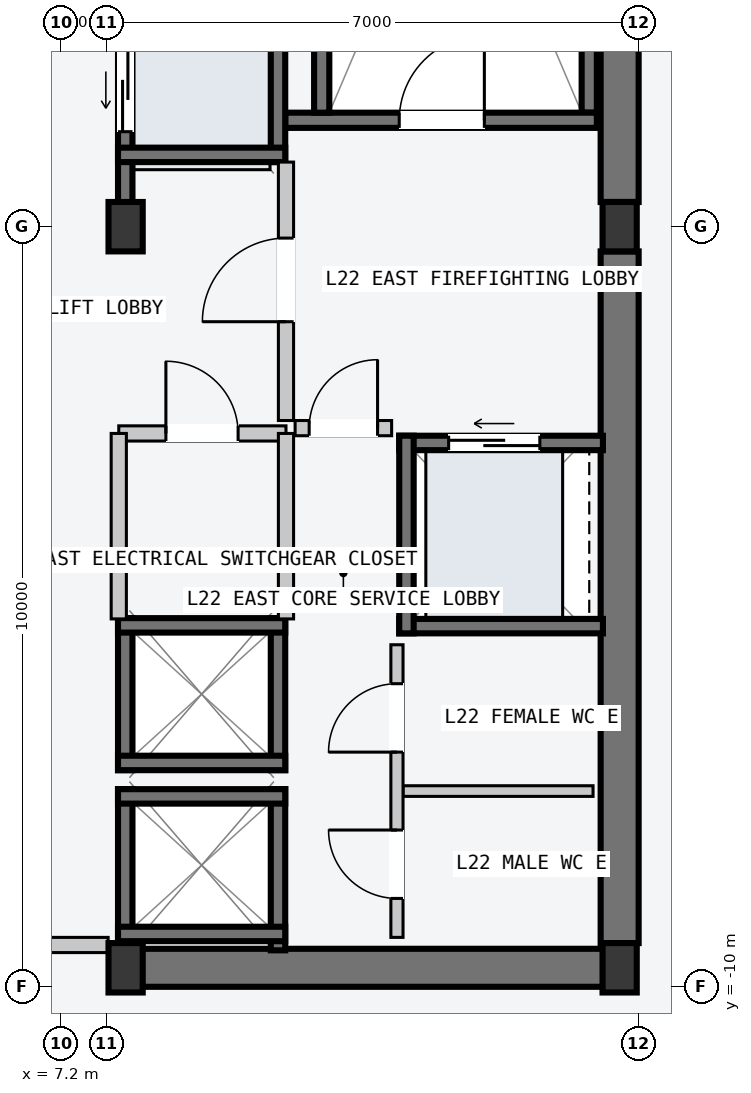
"""IFC4 building model, lengths in metres.
Left out: names, types, materials, properties, quantities, classifications, styles, units other than length and angle.
Written with IfcOpenShell. Run it as: python <this file> out.ifc"""

import sys

from ifc_helpers import new_model, si_unit, direction, frame, frame_2d, origin, origin_2d, place, context, subcontext, project, spatial, rectangle, i_section, extrude, element, fill, save


model = new_model("IFC4")
c1 = context("Model", 3, precision=1e-05, world=origin(), true_north=direction((0.0, 1.0)))
c2 = subcontext(c1, "Body", "Model", "MODEL_VIEW")
j1 = project(units=[si_unit("LENGTHUNIT", "METRE"), si_unit("PLANEANGLEUNIT", "RADIAN")], contexts=[c1])
p1 = place(None, origin())
s1 = spatial("IfcSite", under=j1, at=p1, CompositionType="ELEMENT")
p2 = place(p1, origin())
s2 = spatial("IfcBuilding", under=s1, at=p2, CompositionType="ELEMENT")
p3 = place(p2, frame((0.0, 0.0, 87.3)))
s3 = spatial("IfcBuildingStorey", under=s2, at=p3, CompositionType="ELEMENT", Elevation=87.3)
p4 = place(p3, frame((8.07, -9.75, -0.2), z_axis=(0.0, 0.0, 1.0), x_axis=(1.0, 0.0, 0.0)))
e1 = element("IfcWall", 1, at=p4, inside=s3, PredefinedType="SHEAR", context=c2, shape_type="SweptSolid", body=[
    extrude(rectangle(XDim=6.46, YDim=0.5, at=frame_2d((3.23, 0.0))), origin(), (0.0, 0.0, 1.0), 4.5),
])
for number, where, z_axis, x_axis in (
    (2, (14.55, -9.425, -0.2), (0.0, 0.0, 1.0), (0.0, 1.0, 0.0)),
    (3, (14.55, 0.325, -0.2), (0.0, 0.0, 1.0), (0.0, 1.0, 0.0)),
):
    element("IfcWall", number, at=place(p3, frame(where, z_axis=z_axis, x_axis=x_axis)), inside=s3, PredefinedType="SHEAR", context=c2, shape_type="SweptSolid", body=[
        extrude(rectangle(XDim=9.1, YDim=0.5, at=frame_2d((4.55, 0.0))), origin(), (0.0, 0.0, 1.0), 4.5),
    ])
p5 = place(p3, frame((14.15, 1.5, -0.2), z_axis=(0.0, 0.0, 1.0), x_axis=(0.0, 1.0, 0.0)))
e4 = element("IfcWall", 4, at=p5, inside=s3, PredefinedType="SOLIDWALL", context=c2, shape_type="SweptSolid", body=[
    extrude(rectangle(XDim=7.8, YDim=0.2, at=frame_2d((3.9, 0.0))), origin(), (0.0, 0.0, 1.0), 4.5),
])
p6 = place(p3, frame((10.15, 1.4, -0.2), z_axis=(0.0, 0.0, 1.0), x_axis=(1.0, 0.0, 0.0)))
e5 = element("IfcWall", 5, at=p6, inside=s3, PredefinedType="SOLIDWALL", context=c2, shape_type="SweptSolid", body=[
    extrude(rectangle(XDim=4.1, YDim=0.2, at=frame_2d((2.05, 0.0))), origin(), (0.0, 0.0, 1.0), 4.5),
])
p7 = place(p6, frame((1.5, 0.0, 0.2)))
e6 = element("IfcOpeningElement", 6, at=p7, cuts=e5, PredefinedType="OPENING", context=c2, shape_type="SweptSolid", body=[
    extrude(rectangle(XDim=1.12, YDim=2.18, at=frame_2d((0.56, 1.09))), frame((0.0, 0.11, 0.0), z_axis=(0.0, -1.0, 0.0), x_axis=(1.0, 0.0, 0.0)), (0.0, 0.0, 1.0), 0.22),
])
p8 = place(p3, frame((10.63, 1.5, -0.2), z_axis=(0.0, 0.0, 1.0), x_axis=(0.0, 1.0, 0.0)))
e7 = element("IfcWall", 7, at=p8, inside=s3, PredefinedType="SOLIDWALL", context=c2, shape_type="SweptSolid", body=[
    extrude(rectangle(XDim=7.8, YDim=0.2, at=frame_2d((3.9, 0.0))), origin(), (0.0, 0.0, 1.0), 4.5),
])
for number, where, z_axis, x_axis in (
    (8, (8.05, -9.75, 0.0), (0.0, 0.0, 1.0), (1.0, 0.0, 0.0)),
    (9, (8.05, 0.0, 0.0), (0.0, 0.0, 1.0), (1.0, 0.0, 0.0)),
    (10, (14.55, -9.75, 0.0), (0.0, 0.0, 1.0), (1.0, 0.0, 0.0)),
    (11, (14.55, 0.0, 0.0), (0.0, 0.0, 1.0), (1.0, 0.0, 0.0)),
):
    element("IfcColumn", number, at=place(p3, frame(where, z_axis=z_axis, x_axis=x_axis)), inside=s3, PredefinedType="COLUMN", context=c2, shape_type="SweptSolid", body=[
        extrude(i_section(OverallWidth=0.45, OverallDepth=0.65, WebThickness=0.025, FlangeThickness=0.04, at=origin_2d()), origin(), (0.0, 0.0, 1.0), 4.5),
    ])
p9 = place(p3, frame((8.045, 0.21, -0.2), z_axis=(0.0, 0.0, 1.0), x_axis=(0.0, 1.0, 0.0)))
e12 = element("IfcWall", 12, at=p9, inside=s3, PredefinedType="SOLIDWALL", context=c2, shape_type="SweptSolid", body=[
    extrude(rectangle(XDim=2.54, YDim=0.19, at=frame_2d((1.27, 0.0))), origin(), (0.0, 0.0, 1.0), 4.5),
])
p10 = place(p9, frame((1.04, 0.0, 0.2)))
e13 = element("IfcOpeningElement", 13, at=p10, cuts=e12, PredefinedType="OPENING", context=c2, shape_type="SweptSolid", body=[
    extrude(rectangle(XDim=1.1, YDim=2.2, at=frame_2d((0.55, 1.1))), frame((0.0, 0.105, 0.0), z_axis=(0.0, -1.0, 0.0), x_axis=(1.0, 0.0, 0.0)), (0.0, 0.0, 1.0), 0.21),
])
p11 = place(p3, frame((10.055, 0.85, -0.2), z_axis=(0.0, 0.0, 1.0), x_axis=(0.0, 1.0, 0.0)))
e14 = element("IfcWall", 14, at=p11, inside=s3, PredefinedType="SOLIDWALL", context=c2, shape_type="SweptSolid", body=[
    extrude(rectangle(XDim=1.9, YDim=0.19, at=frame_2d((0.95, 0.0))), origin(), (0.0, 0.0, 1.0), 4.5),
])
p12 = place(p3, frame((7.95, 0.945, -0.2), z_axis=(0.0, 0.0, 1.0), x_axis=(1.0, 0.0, 0.0)))
e15 = element("IfcWall", 15, at=p12, inside=s3, PredefinedType="SOLIDWALL", context=c2, shape_type="SweptSolid", body=[
    extrude(rectangle(XDim=2.2, YDim=0.19, at=frame_2d((1.1, 0.0))), origin(), (0.0, 0.0, 1.0), 4.5),
])
for number, where, z_axis, x_axis in (
    (16, (8.045, -9.52, -0.2), (0.0, 0.0, 1.0), (0.0, 1.0, 0.0)),
    (17, (10.055, -9.52, -0.2), (0.0, 0.0, 1.0), (0.0, 1.0, 0.0)),
):
    element("IfcWall", number, at=place(p3, frame(where, z_axis=z_axis, x_axis=x_axis)), inside=s3, PredefinedType="SOLIDWALL", context=c2, shape_type="SweptSolid", body=[
        extrude(rectangle(XDim=2.12, YDim=0.19, at=frame_2d((1.06, 0.0))), origin(), (0.0, 0.0, 1.0), 4.5),
    ])
for number, where, z_axis, x_axis in (
    (18, (7.95, -7.495, -0.2), (0.0, 0.0, 1.0), (1.0, 0.0, 0.0)),
    (19, (7.95, -9.305, -0.2), (0.0, 0.0, 1.0), (1.0, 0.0, 0.0)),
):
    element("IfcWall", number, at=place(p3, frame(where, z_axis=z_axis, x_axis=x_axis)), inside=s3, PredefinedType="SOLIDWALL", context=c2, shape_type="SweptSolid", body=[
        extrude(rectangle(XDim=2.2, YDim=0.19, at=frame_2d((1.1, 0.0))), origin(), (0.0, 0.0, 1.0), 4.5),
    ])
for number, where, z_axis, x_axis in (
    (20, (8.045, -7.15, -0.2), (0.0, 0.0, 1.0), (0.0, 1.0, 0.0)),
    (21, (10.055, -7.15, -0.2), (0.0, 0.0, 1.0), (0.0, 1.0, 0.0)),
):
    element("IfcWall", number, at=place(p3, frame(where, z_axis=z_axis, x_axis=x_axis)), inside=s3, PredefinedType="SOLIDWALL", context=c2, shape_type="SweptSolid", body=[
        extrude(rectangle(XDim=2.0, YDim=0.19, at=frame_2d((1.0, 0.0))), origin(), (0.0, 0.0, 1.0), 4.5),
    ])
for number, where, z_axis, x_axis in (
    (22, (7.95, -5.245, -0.2), (0.0, 0.0, 1.0), (1.0, 0.0, 0.0)),
    (23, (7.95, -7.055, -0.2), (0.0, 0.0, 1.0), (1.0, 0.0, 0.0)),
):
    element("IfcWall", number, at=place(p3, frame(where, z_axis=z_axis, x_axis=x_axis)), inside=s3, PredefinedType="SOLIDWALL", context=c2, shape_type="SweptSolid", body=[
        extrude(rectangle(XDim=2.2, YDim=0.19, at=frame_2d((1.1, 0.0))), origin(), (0.0, 0.0, 1.0), 4.5),
    ])
p13 = place(p3, frame((11.65, -2.845, -0.2), z_axis=(0.0, 0.0, 1.0), x_axis=(1.0, 0.0, 0.0)))
e24 = element("IfcWall", 24, at=p13, inside=s3, PredefinedType="SOLIDWALL", context=c2, shape_type="SweptSolid", body=[
    extrude(rectangle(XDim=2.68, YDim=0.19, at=frame_2d((1.34, 0.0))), origin(), (0.0, 0.0, 1.0), 4.5),
])
p14 = place(p13, frame((0.65, 0.0, 0.2)))
e25 = element("IfcOpeningElement", 25, at=p14, cuts=e24, PredefinedType="OPENING", context=c2, shape_type="SweptSolid", body=[
    extrude(rectangle(XDim=1.2, YDim=2.2, at=frame_2d((0.6, 1.1))), frame((0.0, 0.105, 0.0), z_axis=(0.0, -1.0, 0.0), x_axis=(1.0, 0.0, 0.0)), (0.0, 0.0, 1.0), 0.21),
])
p15 = place(p3, frame((11.65, -5.255, -0.2), z_axis=(0.0, 0.0, 1.0), x_axis=(1.0, 0.0, 0.0)))
e26 = element("IfcWall", 26, at=p15, inside=s3, PredefinedType="SOLIDWALL", context=c2, shape_type="SweptSolid", body=[
    extrude(rectangle(XDim=2.68, YDim=0.19, at=frame_2d((1.34, 0.0))), origin(), (0.0, 0.0, 1.0), 4.5),
])
p16 = place(p3, frame((11.745, -5.35, -0.2), z_axis=(0.0, 0.0, 1.0), x_axis=(0.0, 1.0, 0.0)))
e27 = element("IfcWall", 27, at=p16, inside=s3, PredefinedType="SOLIDWALL", context=c2, shape_type="SweptSolid", body=[
    extrude(rectangle(XDim=2.6, YDim=0.19, at=frame_2d((1.3, 0.0))), origin(), (0.0, 0.0, 1.0), 4.5),
])
p17 = place(p3, frame((6.02, -9.45, 0.0), z_axis=(0.0, 0.0, 1.0), x_axis=(1.0, 0.0, 0.0)))
e28 = element("IfcWall", 28, at=p17, inside=s3, PredefinedType="PARTITIONING", context=c2, shape_type="SweptSolid", body=[
    extrude(rectangle(XDim=1.8, YDim=0.2, at=frame_2d((0.9, 0.0))), origin(), (0.0, 0.0, 1.0), 4.3),
])
p18 = place(p3, frame((10.16, -2.55, 0.0), z_axis=(0.0, 0.0, 1.0), x_axis=(0.0, 1.0, 0.0)))
e29 = element("IfcWall", 29, at=p18, inside=s3, PredefinedType="PARTITIONING", context=c2, shape_type="SweptSolid", body=[
    extrude(rectangle(XDim=3.4, YDim=0.2, at=frame_2d((1.7, 0.0))), origin(), (0.0, 0.0, 1.0), 4.3),
])
p19 = place(p18, frame((1.3, 0.0, 0.0)))
e30 = element("IfcOpeningElement", 30, at=p19, cuts=e29, PredefinedType="OPENING", context=c2, shape_type="SweptSolid", body=[
    extrude(rectangle(XDim=1.1, YDim=2.15, at=frame_2d((0.55, 1.075))), frame((0.0, 0.11, 0.0), z_axis=(0.0, -1.0, 0.0), x_axis=(1.0, 0.0, 0.0)), (0.0, 0.0, 1.0), 0.22),
])
p20 = place(p3, frame((10.28, -2.65, 0.0), z_axis=(0.0, 0.0, 1.0), x_axis=(1.0, 0.0, 0.0)))
e31 = element("IfcWall", 31, at=p20, inside=s3, PredefinedType="PARTITIONING", context=c2, shape_type="SweptSolid", body=[
    extrude(rectangle(XDim=1.27, YDim=0.2, at=frame_2d((0.635, 0.0))), origin(), (0.0, 0.0, 1.0), 4.3),
])
p21 = place(p20, frame((0.185, 0.0, 0.0)))
e32 = element("IfcOpeningElement", 32, at=p21, cuts=e31, PredefinedType="OPENING", context=c2, shape_type="SweptSolid", body=[
    extrude(rectangle(XDim=0.9, YDim=2.15, at=frame_2d((0.45, 1.075))), frame((0.0, 0.11, 0.0), z_axis=(0.0, -1.0, 0.0), x_axis=(1.0, 0.0, 0.0)), (0.0, 0.0, 1.0), 0.22),
])
p22 = place(p3, frame((7.96, -2.72, 0.0), z_axis=(0.0, 0.0, 1.0), x_axis=(1.0, 0.0, 0.0)))
e33 = element("IfcWall", 33, at=p22, inside=s3, PredefinedType="PARTITIONING", context=c2, shape_type="SweptSolid", body=[
    extrude(rectangle(XDim=2.2, YDim=0.2, at=frame_2d((1.1, 0.0))), origin(), (0.0, 0.0, 1.0), 4.3),
])
p23 = place(p22, frame((0.62, 0.0, 0.0)))
e34 = element("IfcOpeningElement", 34, at=p23, cuts=e33, PredefinedType="OPENING", context=c2, shape_type="SweptSolid", body=[
    extrude(rectangle(XDim=0.95, YDim=2.1, at=frame_2d((0.475, 1.05))), frame((0.0, 0.11, 0.0), z_axis=(0.0, -1.0, 0.0), x_axis=(1.0, 0.0, 0.0)), (0.0, 0.0, 1.0), 0.22),
])
for number, where, z_axis, x_axis in (
    (35, (7.96, -5.16, 0.0), (0.0, 0.0, 1.0), (0.0, 1.0, 0.0)),
    (36, (10.16, -5.16, 0.0), (0.0, 0.0, 1.0), (0.0, 1.0, 0.0)),
):
    element("IfcWall", number, at=place(p3, frame(where, z_axis=z_axis, x_axis=x_axis)), inside=s3, PredefinedType="PARTITIONING", context=c2, shape_type="SweptSolid", body=[
        extrude(rectangle(XDim=2.44, YDim=0.2, at=frame_2d((1.22, 0.0))), origin(), (0.0, 0.0, 1.0), 4.3),
    ])
p24 = place(p3, frame((11.7, -7.425, 0.0), z_axis=(0.0, 0.0, 1.0), x_axis=(1.0, 0.0, 0.0)))
e37 = element("IfcWall", 37, at=p24, inside=s3, PredefinedType="PARTITIONING", context=c2, shape_type="SweptSolid", body=[
    extrude(rectangle(XDim=2.5, YDim=0.14, at=frame_2d((1.25, 0.0))), origin(), (0.0, 0.0, 1.0), 4.3),
])
p25 = place(p3, frame((11.62, -9.35, 0.0), z_axis=(0.0, 0.0, 1.0), x_axis=(0.0, 1.0, 0.0)))
e38 = element("IfcWall", 38, at=p25, inside=s3, PredefinedType="PARTITIONING", context=c2, shape_type="SweptSolid", body=[
    extrude(rectangle(XDim=3.85, YDim=0.16, at=frame_2d((1.925, 0.0))), origin(), (0.0, 0.0, 1.0), 4.3),
])
p26 = place(p25, frame((0.512, 0.0, 0.0)))
e39 = element("IfcOpeningElement", 39, at=p26, cuts=e38, PredefinedType="OPENING", context=c2, shape_type="SweptSolid", body=[
    extrude(rectangle(XDim=0.9, YDim=2.15, at=frame_2d((0.45, 1.075))), frame((0.0, 0.09, 0.0), z_axis=(0.0, -1.0, 0.0), x_axis=(1.0, 0.0, 0.0)), (0.0, 0.0, 1.0), 0.18),
])
p27 = place(p25, frame((2.438, 0.0, 0.0)))
e40 = element("IfcOpeningElement", 40, at=p27, cuts=e38, PredefinedType="OPENING", context=c2, shape_type="SweptSolid", body=[
    extrude(rectangle(XDim=0.9, YDim=2.15, at=frame_2d((0.45, 1.075))), frame((0.0, 0.09, 0.0), z_axis=(0.0, -1.0, 0.0), x_axis=(1.0, 0.0, 0.0)), (0.0, 0.0, 1.0), 0.18),
])
p28 = place(p7, origin())
e41 = element("IfcDoor", 41, at=p28, inside=s3, OperationType="SINGLE_SWING_RIGHT", PredefinedType="DOOR", context=c2, shape_type="SweptSolid", body=[
    extrude(rectangle(XDim=1.12, YDim=2.18, at=frame_2d((0.56, 1.09))), frame((0.0, 0.025, 0.0), z_axis=(0.0, -1.0, 0.0), x_axis=(1.0, 0.0, 0.0)), (0.0, 0.0, 1.0), 0.05),
])
fill(e6, e41)
p29 = place(p10, origin())
e42 = element("IfcDoor", 42, at=p29, inside=s3, OperationType="SLIDING_TO_LEFT", PredefinedType="DOOR", context=c2, shape_type="SweptSolid", body=[
    extrude(rectangle(XDim=1.1, YDim=2.2, at=frame_2d((0.55, 1.1))), frame((0.0, 0.025, 0.0), z_axis=(0.0, -1.0, 0.0), x_axis=(1.0, 0.0, 0.0)), (0.0, 0.0, 1.0), 0.05),
])
fill(e13, e42)
p30 = place(p14, origin())
e43 = element("IfcDoor", 43, at=p30, inside=s3, OperationType="SLIDING_TO_LEFT", PredefinedType="DOOR", context=c2, shape_type="SweptSolid", body=[
    extrude(rectangle(XDim=1.2, YDim=2.2, at=frame_2d((0.6, 1.1))), frame((0.0, 0.025, 0.0), z_axis=(0.0, -1.0, 0.0), x_axis=(1.0, 0.0, 0.0)), (0.0, 0.0, 1.0), 0.05),
])
fill(e25, e43)
p31 = place(p19, origin())
e44 = element("IfcDoor", 44, at=p31, inside=s3, OperationType="SINGLE_SWING_LEFT", PredefinedType="DOOR", context=c2, shape_type="SweptSolid", body=[
    extrude(rectangle(XDim=1.1, YDim=2.15, at=frame_2d((0.55, 1.075))), frame((0.0, 0.025, 0.0), z_axis=(0.0, -1.0, 0.0), x_axis=(1.0, 0.0, 0.0)), (0.0, 0.0, 1.0), 0.05),
])
fill(e30, e44)
p32 = place(p21, origin())
e45 = element("IfcDoor", 45, at=p32, inside=s3, OperationType="SINGLE_SWING_RIGHT", PredefinedType="DOOR", context=c2, shape_type="SweptSolid", body=[
    extrude(rectangle(XDim=0.9, YDim=2.15, at=frame_2d((0.45, 1.075))), frame((0.0, 0.025, 0.0), z_axis=(0.0, -1.0, 0.0), x_axis=(1.0, 0.0, 0.0)), (0.0, 0.0, 1.0), 0.05),
])
fill(e32, e45)
p33 = place(p23, origin())
e46 = element("IfcDoor", 46, at=p33, inside=s3, OperationType="SINGLE_SWING_LEFT", PredefinedType="DOOR", context=c2, shape_type="SweptSolid", body=[
    extrude(rectangle(XDim=0.95, YDim=2.1, at=frame_2d((0.475, 1.05))), frame((0.0, 0.025, 0.0), z_axis=(0.0, -1.0, 0.0), x_axis=(1.0, 0.0, 0.0)), (0.0, 0.0, 1.0), 0.05),
])
fill(e34, e46)
p34 = place(p26, origin())
e47 = element("IfcDoor", 47, at=p34, inside=s3, OperationType="SINGLE_SWING_RIGHT", PredefinedType="DOOR", context=c2, shape_type="SweptSolid", body=[
    extrude(rectangle(XDim=0.9, YDim=2.15, at=frame_2d((0.45, 1.075))), frame((0.0, 0.025, 0.0), z_axis=(0.0, -1.0, 0.0), x_axis=(1.0, 0.0, 0.0)), (0.0, 0.0, 1.0), 0.05),
])
fill(e39, e47)
p35 = place(p27, origin())
e48 = element("IfcDoor", 48, at=p35, inside=s3, OperationType="SINGLE_SWING_LEFT", PredefinedType="DOOR", context=c2, shape_type="SweptSolid", body=[
    extrude(rectangle(XDim=0.9, YDim=2.15, at=frame_2d((0.45, 1.075))), frame((0.0, 0.025, 0.0), z_axis=(0.0, -1.0, 0.0), x_axis=(1.0, 0.0, 0.0)), (0.0, 0.0, 1.0), 0.05),
])
fill(e40, e48)
save(model, sys.argv[1])
